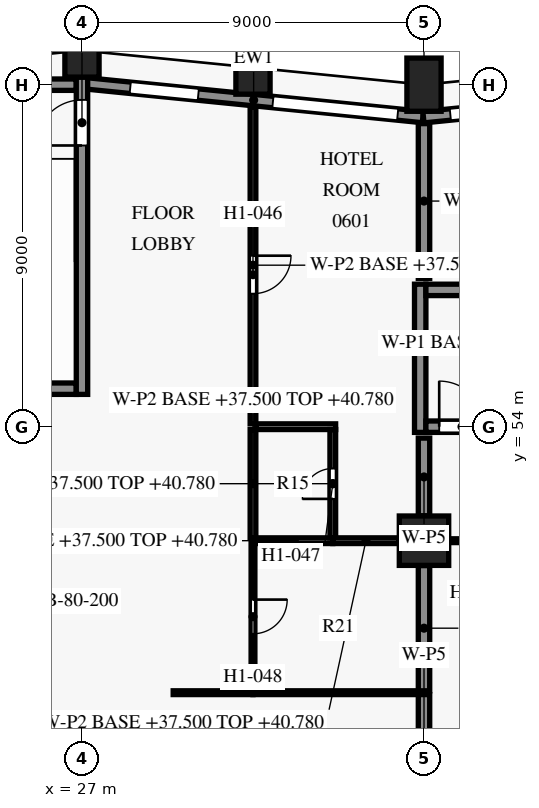
"""IFC4 building model, lengths in metres.
Left out: names, types, materials, properties, quantities, classifications, styles, units other than length and angle.
Written with IfcOpenShell. Run it as: python <this file> out.ifc"""

import sys

from ifc_helpers import new_model, si_unit, direction, frame, frame_2d, origin, origin_2d, place, context, subcontext, project, spatial, rectangle, extrude, element, fill, save


model = new_model("IFC4")
c1 = context("Model", 3, precision=1e-05, world=origin(), true_north=direction((0.0, 1.0)))
c2 = subcontext(c1, "Body", "Model", "MODEL_VIEW")
j1 = project(units=[si_unit("LENGTHUNIT", "METRE"), si_unit("PLANEANGLEUNIT", "RADIAN")], contexts=[c1])
p1 = place(None, origin())
s1 = spatial("IfcSite", under=j1, at=p1, CompositionType="ELEMENT")
p2 = place(p1, origin())
s2 = spatial("IfcBuilding", under=s1, at=p2, CompositionType="ELEMENT")
p3 = place(p2, frame((0.0, 0.0, 37.5)))
s3 = spatial("IfcBuildingStorey", under=s2, at=p3, CompositionType="ELEMENT", Elevation=37.5)
for number, where, z_axis, x_axis in (
    (1, (36.0, 63.0, 0.0), (0.0, 0.0, 1.0), (-1.0, 0.0, 0.0)),
    (2, (31.5, 63.45, 0.0), (0.0, 0.0, 1.0), (-0.995, 0.1, 0.0)),
    (3, (27.0, 63.9, 0.0), (0.0, 0.0, 1.0), (-1.0, 0.0, 0.0)),
):
    element("IfcColumn", number, at=place(p3, frame(where, z_axis=z_axis, x_axis=x_axis)), inside=s3, PredefinedType="COLUMN", context=c2, shape_type="SweptSolid", body=[
        extrude(rectangle(XDim=0.9, YDim=1.4, at=origin_2d()), origin(), (0.0, 0.0, 1.0), 3.6),
    ])
p4 = place(p3, frame((36.0, 51.0, 0.0), z_axis=(0.0, 0.0, 1.0), x_axis=(1.0, 0.0, 0.0)))
e4 = element("IfcColumn", 4, at=p4, inside=s3, PredefinedType="COLUMN", context=c2, shape_type="SweptSolid", body=[
    extrude(rectangle(XDim=1.3, YDim=1.3, at=origin_2d()), origin(), (0.0, 0.0, 1.0), 3.6),
])
p5 = place(p3, frame((35.985, 62.144, 0.0), z_axis=(0.0, 0.0, 1.0), x_axis=(0.995037993253, 0.099495688264, 0.0)))
e5 = element("IfcWall", 5, at=p5, inside=s3, PredefinedType="SOLIDWALL", context=c2, shape_type="SweptSolid", body=[
    extrude(rectangle(XDim=9.03, YDim=0.3, at=frame_2d((4.515, 0.0))), origin(), (0.0, 0.0, 1.0), 2.95),
])
p6 = place(p5, frame((0.711, 0.0, 0.15)))
e6 = element("IfcOpeningElement", 6, at=p6, cuts=e5, PredefinedType="OPENING", context=c2, shape_type="SweptSolid", body=[
    extrude(rectangle(XDim=3.3, YDim=2.4, at=frame_2d((1.65, 1.2))), frame((0.0, 0.16, 0.0), z_axis=(0.0, -1.0, 0.0), x_axis=(1.0, 0.0, 0.0)), (0.0, 0.0, 1.0), 0.32),
])
p7 = place(p5, frame((5.984, 0.0, 0.75)))
e7 = element("IfcOpeningElement", 7, at=p7, cuts=e5, PredefinedType="OPENING", context=c2, shape_type="SweptSolid", body=[
    extrude(rectangle(XDim=1.8, YDim=1.8, at=frame_2d((0.9, 0.9))), frame((0.0, 0.16, 0.0), z_axis=(0.0, -1.0, 0.0), x_axis=(1.0, 0.0, 0.0)), (0.0, 0.0, 1.0), 0.32),
])
p8 = place(p3, frame((27.065, 63.039, 0.0), z_axis=(0.0, 0.0, 1.0), x_axis=(0.995036379926, -0.099511821531, 0.0)))
e8 = element("IfcWall", 8, at=p8, inside=s3, PredefinedType="SOLIDWALL", context=c2, shape_type="SweptSolid", body=[
    extrude(rectangle(XDim=8.95, YDim=0.3, at=frame_2d((4.475, 0.0))), origin(), (0.0, 0.0, 1.0), 2.95),
])
p9 = place(p8, frame((1.211, 0.0, 0.75)))
e9 = element("IfcOpeningElement", 9, at=p9, cuts=e8, PredefinedType="OPENING", context=c2, shape_type="SweptSolid", body=[
    extrude(rectangle(XDim=1.8, YDim=1.8, at=frame_2d((0.9, 0.9))), frame((0.0, 0.16, 0.0), z_axis=(0.0, -1.0, 0.0), x_axis=(1.0, 0.0, 0.0)), (0.0, 0.0, 1.0), 0.32),
])
p10 = place(p8, frame((4.984, 0.0, 0.15)))
e10 = element("IfcOpeningElement", 10, at=p10, cuts=e8, PredefinedType="OPENING", context=c2, shape_type="SweptSolid", body=[
    extrude(rectangle(XDim=3.3, YDim=2.4, at=frame_2d((1.65, 1.2))), frame((0.0, 0.16, 0.0), z_axis=(0.0, -1.0, 0.0), x_axis=(1.0, 0.0, 0.0)), (0.0, 0.0, 1.0), 0.32),
])
p11 = place(p3, frame((36.05, 54.0, 0.0), z_axis=(0.0, 0.0, 1.0), x_axis=(1.0, 0.0, 0.0)))
e11 = element("IfcWall", 11, at=p11, inside=s3, PredefinedType="SHEAR", context=c2, shape_type="SweptSolid", body=[
    extrude(rectangle(XDim=7.7, YDim=0.3, at=frame_2d((3.85, 0.0))), origin(), (0.0, 0.0, 1.0), 3.3),
])
p12 = place(p11, frame((0.35, 0.0, 0.0)))
e12 = element("IfcOpeningElement", 12, at=p12, cuts=e11, PredefinedType="OPENING", context=c2, shape_type="SweptSolid", body=[
    extrude(rectangle(XDim=1.2, YDim=2.2, at=frame_2d((0.6, 1.1))), frame((0.0, 0.16, 0.0), z_axis=(0.0, -1.0, 0.0), x_axis=(1.0, 0.0, 0.0)), (0.0, 0.0, 1.0), 0.32),
])
p13 = place(p3, frame((23.4, 55.0, 0.0), z_axis=(0.0, 0.0, 1.0), x_axis=(1.0, 0.0, 0.0)))
e13 = element("IfcWall", 13, at=p13, inside=s3, PredefinedType="SHEAR", context=c2, shape_type="SweptSolid", body=[
    extrude(rectangle(XDim=3.45, YDim=0.3, at=frame_2d((1.725, 0.0))), origin(), (0.0, 0.0, 1.0), 3.3),
])
p14 = place(p3, frame((36.05, 57.6, 0.0), z_axis=(0.0, 0.0, 1.0), x_axis=(1.0, 0.0, 0.0)))
e14 = element("IfcWall", 14, at=p14, inside=s3, PredefinedType="SHEAR", context=c2, shape_type="SweptSolid", body=[
    extrude(rectangle(XDim=7.7, YDim=0.3, at=frame_2d((3.85, 0.0))), origin(), (0.0, 0.0, 1.0), 3.3),
])
p15 = place(p3, frame((23.55, 63.0, 0.0), z_axis=(0.0, 0.0, 1.0), x_axis=(1.0, 0.0, 0.0)))
e15 = element("IfcWall", 15, at=p15, inside=s3, PredefinedType="SHEAR", context=c2, shape_type="SweptSolid", body=[
    extrude(rectangle(XDim=3.3, YDim=0.3, at=frame_2d((1.65, 0.0))), origin(), (0.0, 0.0, 1.0), 3.3),
])
p16 = place(p3, frame((27.0, 54.85, 0.0), z_axis=(0.0, 0.0, 1.0), x_axis=(0.0, 1.0, 0.0)))
e16 = element("IfcWall", 16, at=p16, inside=s3, PredefinedType="SHEAR", context=c2, shape_type="SweptSolid", body=[
    extrude(rectangle(XDim=8.35, YDim=0.3, at=frame_2d((4.175, 0.0))), origin(), (0.0, 0.0, 1.0), 3.3),
])
p17 = place(p16, frame((6.55, 0.0, 0.0)))
e17 = element("IfcOpeningElement", 17, at=p17, cuts=e16, PredefinedType="OPENING", context=c2, shape_type="SweptSolid", body=[
    extrude(rectangle(XDim=1.2, YDim=2.2, at=frame_2d((0.6, 1.1))), frame((0.0, 0.16, 0.0), z_axis=(0.0, -1.0, 0.0), x_axis=(1.0, 0.0, 0.0)), (0.0, 0.0, 1.0), 0.32),
])
p18 = place(p3, frame((35.9, 53.85, 0.0), z_axis=(0.0, 0.0, 1.0), x_axis=(0.0, 1.0, 0.0)))
e18 = element("IfcWall", 18, at=p18, inside=s3, PredefinedType="SHEAR", context=c2, shape_type="SweptSolid", body=[
    extrude(rectangle(XDim=3.9, YDim=0.3, at=frame_2d((1.95, 0.0))), origin(), (0.0, 0.0, 1.0), 3.3),
])
p19 = place(p3, frame((36.0, 46.95, 0.0), z_axis=(0.0, 0.0, 1.0), x_axis=(0.0, -1.0, 0.0)))
e19 = element("IfcWall", 19, at=p19, inside=s3, PredefinedType="PARTITIONING", context=c2, shape_type="SweptSolid", body=[
    extrude(rectangle(XDim=3.7, YDim=0.3, at=frame_2d((1.85, 0.0))), origin(), (0.0, 0.0, 1.0), 2.58),
])
p20 = place(p19, frame((0.95, 0.0, 0.0)))
e20 = element("IfcOpeningElement", 20, at=p20, cuts=e19, PredefinedType="OPENING", context=c2, shape_type="SweptSolid", body=[
    extrude(rectangle(XDim=1.8, YDim=2.1, at=frame_2d((0.9, 1.05))), frame((0.0, 0.16, 0.0), z_axis=(0.0, -1.0, 0.0), x_axis=(1.0, 0.0, 0.0)), (0.0, 0.0, 1.0), 0.32),
])
p21 = place(p3, frame((29.4, 47.0, 0.0), z_axis=(0.0, 0.0, 1.0), x_axis=(1.0, 0.0, 0.0)))
e21 = element("IfcWall", 21, at=p21, inside=s3, PredefinedType="PARTITIONING", context=c2, shape_type="SweptSolid", body=[
    extrude(rectangle(XDim=2.1, YDim=0.1, at=frame_2d((1.05, 0.0))), origin(), (0.0, 0.0, 1.0), 3.28),
])
p22 = place(p3, frame((31.5, 47.0, 0.0), z_axis=(0.0, 0.0, 1.0), x_axis=(1.0, 0.0, 0.0)))
e22 = element("IfcWall", 22, at=p22, inside=s3, PredefinedType="PARTITIONING", context=c2, shape_type="SweptSolid", body=[
    extrude(rectangle(XDim=4.35, YDim=0.1, at=frame_2d((2.175, 0.0))), origin(), (0.0, 0.0, 1.0), 3.28),
])
p23 = place(p3, frame((36.0, 50.345, 0.0), z_axis=(0.0, 0.0, 1.0), x_axis=(0.0, -1.0, 0.0)))
e23 = element("IfcWall", 23, at=p23, inside=s3, PredefinedType="PARTITIONING", context=c2, shape_type="SweptSolid", body=[
    extrude(rectangle(XDim=3.295, YDim=0.3, at=frame_2d((1.647, 0.0))), origin(), (0.0, 0.0, 1.0), 2.58),
])
p24 = place(p3, frame((31.5, 50.925, 0.0), z_axis=(0.0, 0.0, 1.0), x_axis=(0.0, -1.0, 0.0)))
e24 = element("IfcWall", 24, at=p24, inside=s3, PredefinedType="PARTITIONING", context=c2, shape_type="SweptSolid", body=[
    extrude(rectangle(XDim=3.875, YDim=0.1, at=frame_2d((1.938, 0.0))), origin(), (0.0, 0.0, 1.0), 3.28),
])
p25 = place(p24, frame((1.475, 0.0, 0.0)))
e25 = element("IfcOpeningElement", 25, at=p25, cuts=e24, PredefinedType="OPENING", context=c2, shape_type="SweptSolid", body=[
    extrude(rectangle(XDim=0.9, YDim=2.1, at=frame_2d((0.45, 1.05))), frame((0.0, 0.06, 0.0), z_axis=(0.0, -1.0, 0.0), x_axis=(1.0, 0.0, 0.0)), (0.0, 0.0, 1.0), 0.12),
])
p26 = place(p3, frame((31.575, 51.0, 0.0), z_axis=(0.0, 0.0, 1.0), x_axis=(1.0, 0.0, 0.0)))
e26 = element("IfcWall", 26, at=p26, inside=s3, PredefinedType="PARTITIONING", context=c2, shape_type="SweptSolid", body=[
    extrude(rectangle(XDim=2.025, YDim=0.15, at=frame_2d((1.013, 0.0))), origin(), (0.0, 0.0, 1.0), 3.28),
])
p27 = place(p3, frame((33.6, 51.0, 0.0), z_axis=(0.0, 0.0, 1.0), x_axis=(1.0, 0.0, 0.0)))
e27 = element("IfcWall", 27, at=p27, inside=s3, PredefinedType="PARTITIONING", context=c2, shape_type="SweptSolid", body=[
    extrude(rectangle(XDim=1.745, YDim=0.15, at=frame_2d((0.873, 0.0))), origin(), (0.0, 0.0, 1.0), 3.28),
])
p28 = place(p3, frame((40.5, 51.0, 0.0), z_axis=(0.0, 0.0, 1.0), x_axis=(-1.0, 0.0, 0.0)))
e28 = element("IfcWall", 28, at=p28, inside=s3, PredefinedType="PARTITIONING", context=c2, shape_type="SweptSolid", body=[
    extrude(rectangle(XDim=3.845, YDim=0.1, at=frame_2d((1.922, 0.0))), origin(), (0.0, 0.0, 1.0), 2.58),
])
p29 = place(p28, frame((1.8, 0.0, 0.0)))
e29 = element("IfcOpeningElement", 29, at=p29, cuts=e28, PredefinedType="OPENING", context=c2, shape_type="SweptSolid", body=[
    extrude(rectangle(XDim=0.9, YDim=2.1, at=frame_2d((0.45, 1.05))), frame((0.0, 0.06, 0.0), z_axis=(0.0, -1.0, 0.0), x_axis=(1.0, 0.0, 0.0)), (0.0, 0.0, 1.0), 0.12),
])
p30 = place(p3, frame((33.6, 51.075, 0.0), z_axis=(0.0, 0.0, 1.0), x_axis=(0.0, 1.0, 0.0)))
e30 = element("IfcWall", 30, at=p30, inside=s3, PredefinedType="PARTITIONING", context=c2, shape_type="SweptSolid", body=[
    extrude(rectangle(XDim=2.85, YDim=0.15, at=frame_2d((1.425, 0.0))), origin(), (0.0, 0.0, 1.0), 3.28),
])
p31 = place(p30, frame((1.025, 0.0, 0.0)))
e31 = element("IfcOpeningElement", 31, at=p31, cuts=e30, PredefinedType="OPENING", context=c2, shape_type="SweptSolid", body=[
    extrude(rectangle(XDim=0.8, YDim=2.1, at=frame_2d((0.4, 1.05))), frame((0.0, 0.085, 0.0), z_axis=(0.0, -1.0, 0.0), x_axis=(1.0, 0.0, 0.0)), (0.0, 0.0, 1.0), 0.17),
])
p32 = place(p3, frame((36.0, 53.7, 0.0), z_axis=(0.0, 0.0, 1.0), x_axis=(0.0, -1.0, 0.0)))
e32 = element("IfcWall", 32, at=p32, inside=s3, PredefinedType="PARTITIONING", context=c2, shape_type="SweptSolid", body=[
    extrude(rectangle(XDim=2.045, YDim=0.3, at=frame_2d((1.022, 0.0))), origin(), (0.0, 0.0, 1.0), 2.58),
])
p33 = place(p3, frame((31.5, 53.925, 0.0), z_axis=(0.0, 0.0, 1.0), x_axis=(0.0, -1.0, 0.0)))
e33 = element("IfcWall", 33, at=p33, inside=s3, PredefinedType="PARTITIONING", context=c2, shape_type="SweptSolid", body=[
    extrude(rectangle(XDim=2.85, YDim=0.15, at=frame_2d((1.425, 0.0))), origin(), (0.0, 0.0, 1.0), 3.28),
])
p34 = place(p3, frame((33.675, 54.0, 0.0), z_axis=(0.0, 0.0, 1.0), x_axis=(-1.0, 0.0, 0.0)))
e34 = element("IfcWall", 34, at=p34, inside=s3, PredefinedType="PARTITIONING", context=c2, shape_type="SweptSolid", body=[
    extrude(rectangle(XDim=2.1, YDim=0.15, at=frame_2d((1.05, 0.0))), origin(), (0.0, 0.0, 1.0), 3.28),
])
p35 = place(p3, frame((36.0, 61.975, 0.0), z_axis=(0.0, 0.0, 1.0), x_axis=(0.0, -1.0, 0.0)))
e35 = element("IfcWall", 35, at=p35, inside=s3, PredefinedType="PARTITIONING", context=c2, shape_type="SweptSolid", body=[
    extrude(rectangle(XDim=4.075, YDim=0.3, at=frame_2d((2.038, 0.0))), origin(), (0.0, 0.0, 1.0), 2.58),
])
p36 = place(p3, frame((31.5, 62.425, 0.0), z_axis=(0.0, 0.0, 1.0), x_axis=(0.0, -1.0, 0.0)))
e36 = element("IfcWall", 36, at=p36, inside=s3, PredefinedType="PARTITIONING", context=c2, shape_type="SweptSolid", body=[
    extrude(rectangle(XDim=8.35, YDim=0.15, at=frame_2d((4.175, 0.0))), origin(), (0.0, 0.0, 1.0), 3.28),
])
p37 = place(p36, frame((3.925, 0.0, 0.0)))
e37 = element("IfcOpeningElement", 37, at=p37, cuts=e36, PredefinedType="OPENING", context=c2, shape_type="SweptSolid", body=[
    extrude(rectangle(XDim=1.0, YDim=2.1, at=frame_2d((0.5, 1.05))), frame((0.0, 0.085, 0.0), z_axis=(0.0, -1.0, 0.0), x_axis=(1.0, 0.0, 0.0)), (0.0, 0.0, 1.0), 0.17),
])
p38 = place(p6, origin())
e38 = element("IfcWindow", 38, at=p38, inside=s3, PartitioningType="SINGLE_PANEL", PredefinedType="WINDOW", context=c2, shape_type="SweptSolid", body=[
    extrude(rectangle(XDim=3.3, YDim=2.4, at=frame_2d((1.65, 1.2))), frame((0.0, 0.03, 0.0), z_axis=(0.0, -1.0, 0.0), x_axis=(1.0, 0.0, 0.0)), (0.0, 0.0, 1.0), 0.06),
])
fill(e6, e38)
p39 = place(p9, origin())
e39 = element("IfcWindow", 39, at=p39, inside=s3, PartitioningType="SINGLE_PANEL", PredefinedType="WINDOW", context=c2, shape_type="SweptSolid", body=[
    extrude(rectangle(XDim=1.8, YDim=1.8, at=frame_2d((0.9, 0.9))), frame((0.0, 0.03, 0.0), z_axis=(0.0, -1.0, 0.0), x_axis=(1.0, 0.0, 0.0)), (0.0, 0.0, 1.0), 0.06),
])
fill(e9, e39)
p40 = place(p10, origin())
e40 = element("IfcWindow", 40, at=p40, inside=s3, PartitioningType="SINGLE_PANEL", PredefinedType="WINDOW", context=c2, shape_type="SweptSolid", body=[
    extrude(rectangle(XDim=3.3, YDim=2.4, at=frame_2d((1.65, 1.2))), frame((0.0, 0.03, 0.0), z_axis=(0.0, -1.0, 0.0), x_axis=(1.0, 0.0, 0.0)), (0.0, 0.0, 1.0), 0.06),
])
fill(e10, e40)
p41 = place(p17, origin())
e41 = element("IfcDoor", 41, at=p41, inside=s3, OperationType="SINGLE_SWING_LEFT", PredefinedType="DOOR", context=c2, shape_type="SweptSolid", body=[
    extrude(rectangle(XDim=1.2, YDim=2.2, at=frame_2d((0.6, 1.1))), frame((0.0, 0.025, 0.0), z_axis=(0.0, -1.0, 0.0), x_axis=(1.0, 0.0, 0.0)), (0.0, 0.0, 1.0), 0.05),
])
fill(e17, e41)
p42 = place(p12, origin())
e42 = element("IfcDoor", 42, at=p42, inside=s3, OperationType="SINGLE_SWING_LEFT", PredefinedType="DOOR", context=c2, shape_type="SweptSolid", body=[
    extrude(rectangle(XDim=1.2, YDim=2.2, at=frame_2d((0.6, 1.1))), frame((0.0, 0.025, 0.0), z_axis=(0.0, -1.0, 0.0), x_axis=(1.0, 0.0, 0.0)), (0.0, 0.0, 1.0), 0.05),
])
fill(e12, e42)
p43 = place(p37, origin())
e43 = element("IfcDoor", 43, at=p43, inside=s3, OperationType="SINGLE_SWING_LEFT", PredefinedType="DOOR", context=c2, shape_type="SweptSolid", body=[
    extrude(rectangle(XDim=1.0, YDim=2.1, at=frame_2d((0.5, 1.05))), frame((0.0, 0.025, 0.0), z_axis=(0.0, -1.0, 0.0), x_axis=(1.0, 0.0, 0.0)), (0.0, 0.0, 1.0), 0.05),
])
fill(e37, e43)
p44 = place(p31, origin())
e44 = element("IfcDoor", 44, at=p44, inside=s3, OperationType="SINGLE_SWING_LEFT", PredefinedType="DOOR", context=c2, shape_type="SweptSolid", body=[
    extrude(rectangle(XDim=0.8, YDim=2.1, at=frame_2d((0.4, 1.05))), frame((0.0, 0.025, 0.0), z_axis=(0.0, -1.0, 0.0), x_axis=(1.0, 0.0, 0.0)), (0.0, 0.0, 1.0), 0.05),
])
fill(e31, e44)
p45 = place(p25, origin())
e45 = element("IfcDoor", 45, at=p45, inside=s3, OperationType="SINGLE_SWING_LEFT", PredefinedType="DOOR", context=c2, shape_type="SweptSolid", body=[
    extrude(rectangle(XDim=0.9, YDim=2.1, at=frame_2d((0.45, 1.05))), frame((0.0, 0.025, 0.0), z_axis=(0.0, -1.0, 0.0), x_axis=(1.0, 0.0, 0.0)), (0.0, 0.0, 1.0), 0.05),
])
fill(e25, e45)
save(model, sys.argv[1])
